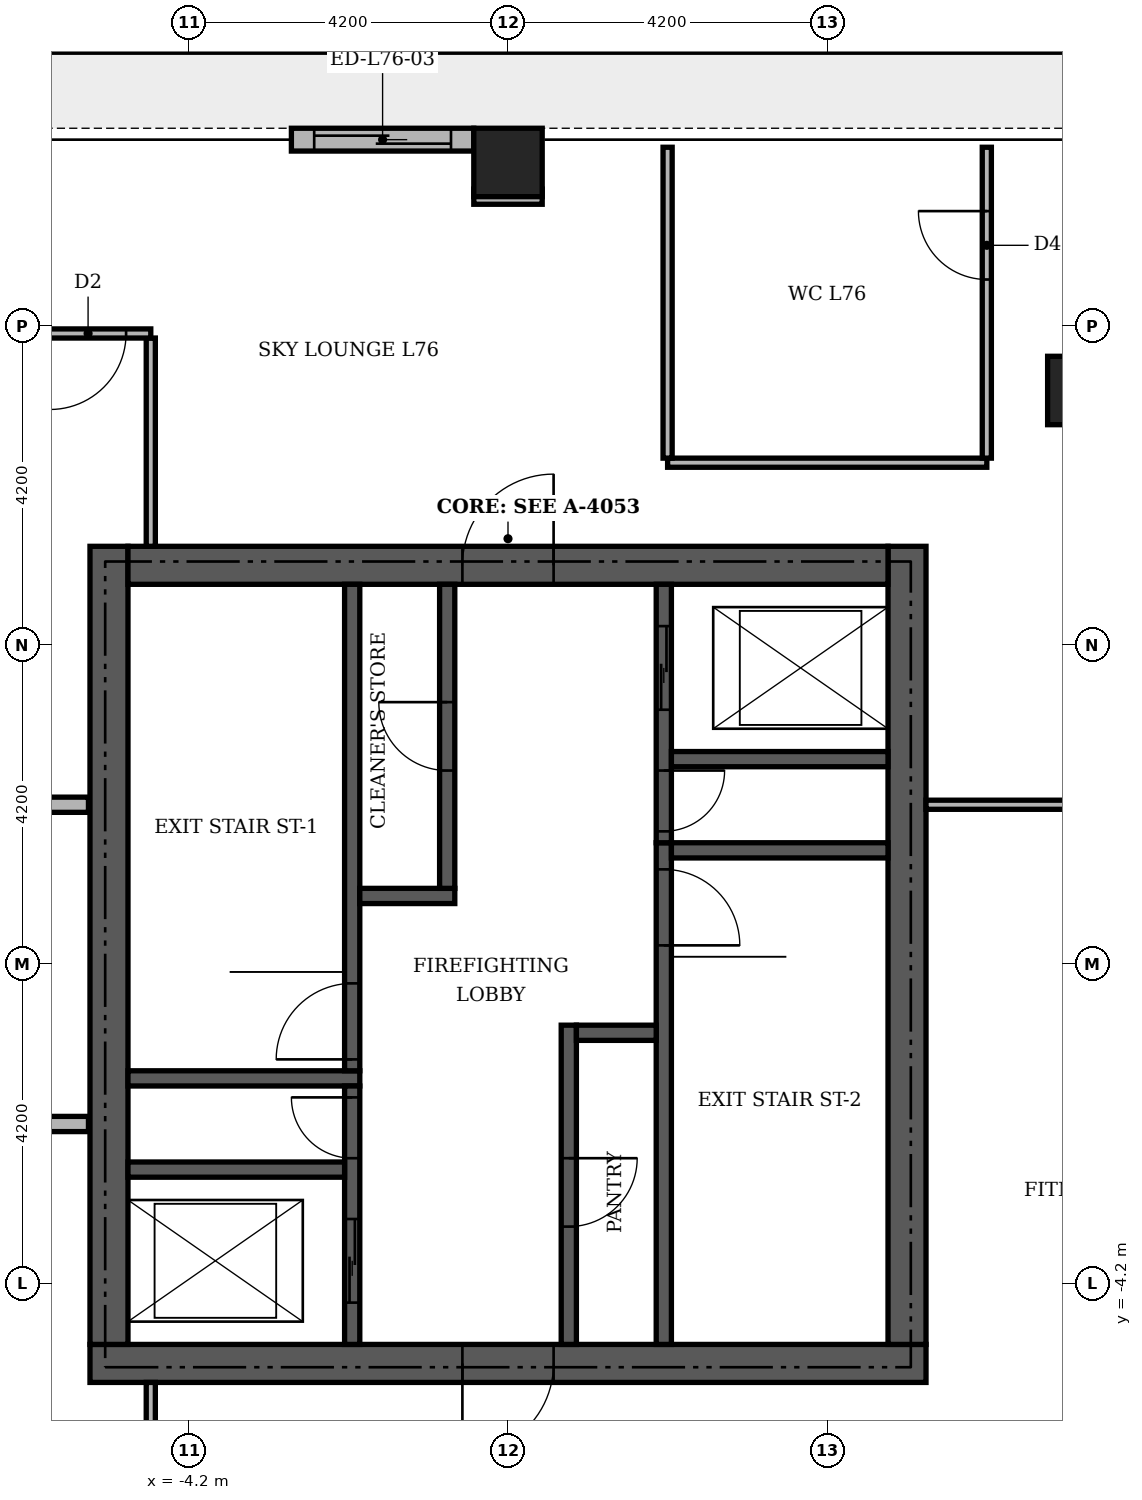
"""IFC4 building model, lengths in metres.
Left out: names, types, materials, properties, quantities, classifications, styles, units other than length and angle.
Written with IfcOpenShell. Run it as: python <this file> out.ifc"""

import sys

from ifc_helpers import new_model, si_unit, direction, frame, frame_2d, origin, origin_2d, place, context, subcontext, project, spatial, rectangle, extrude, element, fill, save


model = new_model("IFC4")
c1 = context("Model", 3, precision=1e-05, world=origin(), true_north=direction((0.0, 1.0)))
c2 = subcontext(c1, "Body", "Model", "MODEL_VIEW")
j1 = project(units=[si_unit("LENGTHUNIT", "METRE"), si_unit("PLANEANGLEUNIT", "RADIAN")], contexts=[c1])
p1 = place(None, origin())
s1 = spatial("IfcSite", under=j1, at=p1, CompositionType="ELEMENT")
p2 = place(p1, origin())
s2 = spatial("IfcBuilding", under=s1, at=p2, CompositionType="ELEMENT")
p3 = place(p2, frame((0.0, 0.0, 316.2)))
s3 = spatial("IfcBuildingStorey", under=s2, at=p3, CompositionType="ELEMENT", Elevation=316.2)
p4 = place(p3, frame((-5.5, -5.25, 0.0), z_axis=(0.0, 0.0, 1.0), x_axis=(1.0, 0.0, 0.0)))
e1 = element("IfcWall", 1, at=p4, inside=s3, PredefinedType="SHEAR", context=c2, shape_type="SweptSolid", body=[
    extrude(rectangle(XDim=11.0, YDim=0.5, at=frame_2d((5.5, 0.0))), origin(), (0.0, 0.0, 1.0), 5.0),
])
p5 = place(p4, frame((4.9, 0.0, 0.0)))
e2 = element("IfcOpeningElement", 2, at=p5, cuts=e1, PredefinedType="OPENING", context=c2, shape_type="SweptSolid", body=[
    extrude(rectangle(XDim=1.2, YDim=2.1, at=frame_2d((0.6, 1.05))), frame((0.0, 0.26, 0.0), z_axis=(0.0, -1.0, 0.0), x_axis=(1.0, 0.0, 0.0)), (0.0, 0.0, 1.0), 0.52),
])
for number, where, z_axis, x_axis in (
    (3, (-5.25, -5.0, 0.0), (0.0, 0.0, 1.0), (0.0, 1.0, 0.0)),
    (4, (5.25, -5.0, 0.0), (0.0, 0.0, 1.0), (0.0, 1.0, 0.0)),
):
    element("IfcWall", number, at=place(p3, frame(where, z_axis=z_axis, x_axis=x_axis)), inside=s3, PredefinedType="SHEAR", context=c2, shape_type="SweptSolid", body=[
        extrude(rectangle(XDim=10.5, YDim=0.5, at=frame_2d((5.25, 0.0))), origin(), (0.0, 0.0, 1.0), 5.0),
    ])
p6 = place(p3, frame((-5.0, 5.25, 0.0), z_axis=(0.0, 0.0, 1.0), x_axis=(1.0, 0.0, 0.0)))
e5 = element("IfcWall", 5, at=p6, inside=s3, PredefinedType="SHEAR", context=c2, shape_type="SweptSolid", body=[
    extrude(rectangle(XDim=10.0, YDim=0.5, at=frame_2d((5.0, 0.0))), origin(), (0.0, 0.0, 1.0), 5.0),
])
p7 = place(p6, frame((4.4, 0.0, 0.0)))
e6 = element("IfcOpeningElement", 6, at=p7, cuts=e5, PredefinedType="OPENING", context=c2, shape_type="SweptSolid", body=[
    extrude(rectangle(XDim=1.2, YDim=2.1, at=frame_2d((0.6, 1.05))), frame((0.0, 0.26, 0.0), z_axis=(0.0, -1.0, 0.0), x_axis=(1.0, 0.0, 0.0)), (0.0, 0.0, 1.0), 0.52),
])
p8 = place(p3, frame((2.05, -5.0, 0.0), z_axis=(0.0, 0.0, 1.0), x_axis=(0.0, 1.0, 0.0)))
e7 = element("IfcWall", 7, at=p8, inside=s3, PredefinedType="SHEAR", context=c2, shape_type="SweptSolid", body=[
    extrude(rectangle(XDim=6.6, YDim=0.2, at=frame_2d((3.3, 0.0))), origin(), (0.0, 0.0, 1.0), 5.0),
])
p9 = place(p8, frame((5.25, 0.0, 0.0)))
e8 = element("IfcOpeningElement", 8, at=p9, cuts=e7, PredefinedType="OPENING", context=c2, shape_type="SweptSolid", body=[
    extrude(rectangle(XDim=1.0, YDim=2.1, at=frame_2d((0.5, 1.05))), frame((0.0, 0.11, 0.0), z_axis=(0.0, -1.0, 0.0), x_axis=(1.0, 0.0, 0.0)), (0.0, 0.0, 1.0), 0.22),
])
p10 = place(p3, frame((-5.0, -1.5, 0.0), z_axis=(0.0, 0.0, 1.0), x_axis=(1.0, 0.0, 0.0)))
e9 = element("IfcWall", 9, at=p10, inside=s3, PredefinedType="SHEAR", context=c2, shape_type="SweptSolid", body=[
    extrude(rectangle(XDim=3.05, YDim=0.2, at=frame_2d((1.525, 0.0))), origin(), (0.0, 0.0, 1.0), 5.0),
])
p11 = place(p3, frame((-2.05, -1.4, 0.0), z_axis=(0.0, 0.0, 1.0), x_axis=(0.0, 1.0, 0.0)))
e10 = element("IfcWall", 10, at=p11, inside=s3, PredefinedType="SHEAR", context=c2, shape_type="SweptSolid", body=[
    extrude(rectangle(XDim=6.4, YDim=0.2, at=frame_2d((3.2, 0.0))), origin(), (0.0, 0.0, 1.0), 5.0),
])
p12 = place(p11, frame((0.15, 0.0, 0.0)))
e11 = element("IfcOpeningElement", 11, at=p12, cuts=e10, PredefinedType="OPENING", context=c2, shape_type="SweptSolid", body=[
    extrude(rectangle(XDim=1.0, YDim=2.1, at=frame_2d((0.5, 1.05))), frame((0.0, 0.11, 0.0), z_axis=(0.0, -1.0, 0.0), x_axis=(1.0, 0.0, 0.0)), (0.0, 0.0, 1.0), 0.22),
])
p13 = place(p3, frame((2.15, 1.5, 0.0), z_axis=(0.0, 0.0, 1.0), x_axis=(1.0, 0.0, 0.0)))
e12 = element("IfcWall", 12, at=p13, inside=s3, PredefinedType="SHEAR", context=c2, shape_type="SweptSolid", body=[
    extrude(rectangle(XDim=2.85, YDim=0.2, at=frame_2d((1.425, 0.0))), origin(), (0.0, 0.0, 1.0), 5.0),
])
p14 = place(p3, frame((-2.05, -5.0, 0.0), z_axis=(0.0, 0.0, 1.0), x_axis=(0.0, 1.0, 0.0)))
e13 = element("IfcWall", 13, at=p14, inside=s3, PredefinedType="SHEAR", context=c2, shape_type="SweptSolid", body=[
    extrude(rectangle(XDim=3.4, YDim=0.2, at=frame_2d((1.7, 0.0))), origin(), (0.0, 0.0, 1.0), 5.0),
])
p15 = place(p14, frame((0.55, 0.0, 0.0)))
e14 = element("IfcOpeningElement", 14, at=p15, cuts=e13, PredefinedType="OPENING", context=c2, shape_type="SweptSolid", body=[
    extrude(rectangle(XDim=1.1, YDim=2.1, at=frame_2d((0.55, 1.05))), frame((0.0, 0.11, 0.0), z_axis=(0.0, -1.0, 0.0), x_axis=(1.0, 0.0, 0.0)), (0.0, 0.0, 1.0), 0.22),
])
p16 = place(p14, frame((2.45, 0.0, 0.0)))
e15 = element("IfcOpeningElement", 15, at=p16, cuts=e13, PredefinedType="OPENING", context=c2, shape_type="SweptSolid", body=[
    extrude(rectangle(XDim=0.8, YDim=2.1, at=frame_2d((0.4, 1.05))), frame((0.0, 0.11, 0.0), z_axis=(0.0, -1.0, 0.0), x_axis=(1.0, 0.0, 0.0)), (0.0, 0.0, 1.0), 0.22),
])
p17 = place(p3, frame((0.8, -5.0, 0.0), z_axis=(0.0, 0.0, 1.0), x_axis=(0.0, 1.0, 0.0)))
e16 = element("IfcWall", 16, at=p17, inside=s3, PredefinedType="SHEAR", context=c2, shape_type="SweptSolid", body=[
    extrude(rectangle(XDim=4.2, YDim=0.2, at=frame_2d((2.1, 0.0))), origin(), (0.0, 0.0, 1.0), 5.0),
])
p18 = place(p17, frame((1.55, 0.0, 0.0)))
e17 = element("IfcOpeningElement", 17, at=p18, cuts=e16, PredefinedType="OPENING", context=c2, shape_type="SweptSolid", body=[
    extrude(rectangle(XDim=0.9, YDim=2.1, at=frame_2d((0.45, 1.05))), frame((0.0, 0.11, 0.0), z_axis=(0.0, -1.0, 0.0), x_axis=(1.0, 0.0, 0.0)), (0.0, 0.0, 1.0), 0.22),
])
p19 = place(p3, frame((-5.0, -2.7, 0.0), z_axis=(0.0, 0.0, 1.0), x_axis=(1.0, 0.0, 0.0)))
e18 = element("IfcWall", 18, at=p19, inside=s3, PredefinedType="SHEAR", context=c2, shape_type="SweptSolid", body=[
    extrude(rectangle(XDim=2.85, YDim=0.2, at=frame_2d((1.425, 0.0))), origin(), (0.0, 0.0, 1.0), 5.0),
])
p20 = place(p3, frame((0.9, -0.9, 0.0), z_axis=(0.0, 0.0, 1.0), x_axis=(1.0, 0.0, 0.0)))
e19 = element("IfcWall", 19, at=p20, inside=s3, PredefinedType="SHEAR", context=c2, shape_type="SweptSolid", body=[
    extrude(rectangle(XDim=1.05, YDim=0.2, at=frame_2d((0.525, 0.0))), origin(), (0.0, 0.0, 1.0), 5.0),
])
p21 = place(p3, frame((-1.95, 0.9, 0.0), z_axis=(0.0, 0.0, 1.0), x_axis=(1.0, 0.0, 0.0)))
e20 = element("IfcWall", 20, at=p21, inside=s3, PredefinedType="SHEAR", context=c2, shape_type="SweptSolid", body=[
    extrude(rectangle(XDim=1.25, YDim=0.2, at=frame_2d((0.625, 0.0))), origin(), (0.0, 0.0, 1.0), 5.0),
])
p22 = place(p3, frame((-0.8, 1.0, 0.0), z_axis=(0.0, 0.0, 1.0), x_axis=(0.0, 1.0, 0.0)))
e21 = element("IfcWall", 21, at=p22, inside=s3, PredefinedType="SHEAR", context=c2, shape_type="SweptSolid", body=[
    extrude(rectangle(XDim=4.0, YDim=0.2, at=frame_2d((2.0, 0.0))), origin(), (0.0, 0.0, 1.0), 5.0),
])
p23 = place(p22, frame((1.55, 0.0, 0.0)))
e22 = element("IfcOpeningElement", 22, at=p23, cuts=e21, PredefinedType="OPENING", context=c2, shape_type="SweptSolid", body=[
    extrude(rectangle(XDim=0.9, YDim=2.1, at=frame_2d((0.45, 1.05))), frame((0.0, 0.11, 0.0), z_axis=(0.0, -1.0, 0.0), x_axis=(1.0, 0.0, 0.0)), (0.0, 0.0, 1.0), 0.22),
])
p24 = place(p3, frame((2.05, 1.6, 0.0), z_axis=(0.0, 0.0, 1.0), x_axis=(0.0, 1.0, 0.0)))
e23 = element("IfcWall", 23, at=p24, inside=s3, PredefinedType="SHEAR", context=c2, shape_type="SweptSolid", body=[
    extrude(rectangle(XDim=3.4, YDim=0.2, at=frame_2d((1.7, 0.0))), origin(), (0.0, 0.0, 1.0), 5.0),
])
p25 = place(p24, frame((1.75, 0.0, 0.0)))
e24 = element("IfcOpeningElement", 24, at=p25, cuts=e23, PredefinedType="OPENING", context=c2, shape_type="SweptSolid", body=[
    extrude(rectangle(XDim=1.1, YDim=2.1, at=frame_2d((0.55, 1.05))), frame((0.0, 0.11, 0.0), z_axis=(0.0, -1.0, 0.0), x_axis=(1.0, 0.0, 0.0)), (0.0, 0.0, 1.0), 0.22),
])
p26 = place(p24, frame((0.15, 0.0, 0.0)))
e25 = element("IfcOpeningElement", 25, at=p26, cuts=e23, PredefinedType="OPENING", context=c2, shape_type="SweptSolid", body=[
    extrude(rectangle(XDim=0.8, YDim=2.1, at=frame_2d((0.4, 1.05))), frame((0.0, 0.11, 0.0), z_axis=(0.0, -1.0, 0.0), x_axis=(1.0, 0.0, 0.0)), (0.0, 0.0, 1.0), 0.22),
])
p27 = place(p3, frame((2.15, 2.7, 0.0), z_axis=(0.0, 0.0, 1.0), x_axis=(1.0, 0.0, 0.0)))
e26 = element("IfcWall", 26, at=p27, inside=s3, PredefinedType="SHEAR", context=c2, shape_type="SweptSolid", body=[
    extrude(rectangle(XDim=2.85, YDim=0.2, at=frame_2d((1.425, 0.0))), origin(), (0.0, 0.0, 1.0), 5.0),
])
for number, where, z_axis, x_axis in (
    (27, (7.55, 7.55, -0.35), (0.0, 0.0, 1.0), (1.0, 0.0, 0.0)),
    (28, (0.0, 10.55, -0.35), (0.0, 0.0, 1.0), (1.0, 0.0, 0.0)),
):
    element("IfcColumn", number, at=place(p3, frame(where, z_axis=z_axis, x_axis=x_axis)), inside=s3, PredefinedType="COLUMN", context=c2, shape_type="SweptSolid", body=[
        extrude(rectangle(XDim=0.9, YDim=0.9, at=origin_2d()), origin(), (0.0, 0.0, 1.0), 5.75),
    ])
p28 = place(p3, frame((-0.45, 10.85, 0.0), z_axis=(0.0, 0.0, 1.0), x_axis=(-1.0, 0.0, 0.0)))
e29 = element("IfcWall", 29, at=p28, inside=s3, PredefinedType="STANDARD", context=c2, shape_type="SweptSolid", body=[
    extrude(rectangle(XDim=2.4, YDim=0.3, at=frame_2d((1.2, 0.0))), origin(), (0.0, 0.0, 1.0), 5.0),
])
p29 = place(p28, frame((0.3, 0.0, 0.0)))
e30 = element("IfcOpeningElement", 30, at=p29, cuts=e29, PredefinedType="OPENING", context=c2, shape_type="SweptSolid", body=[
    extrude(rectangle(XDim=1.8, YDim=2.4, at=frame_2d((0.9, 1.2))), frame((0.0, 0.16, 0.0), z_axis=(0.0, -1.0, 0.0), x_axis=(1.0, 0.0, 0.0)), (0.0, 0.0, 1.0), 0.32),
])
p30 = place(p3, frame((-4.7, -8.24, 0.0), z_axis=(0.0, 0.0, 1.0), x_axis=(0.0, 1.0, 0.0)))
e31 = element("IfcWall", 31, at=p30, inside=s3, PredefinedType="PARTITIONING", context=c2, shape_type="SweptSolid", body=[
    extrude(rectangle(XDim=2.74, YDim=0.12, at=frame_2d((1.37, 0.0))), origin(), (0.0, 0.0, 1.0), 5.0),
])
for number, where, z_axis, x_axis in (
    (32, (-10.75, -2.1, 0.0), (0.0, 0.0, 1.0), (1.0, 0.0, 0.0)),
    (33, (-10.75, 2.1, 0.0), (0.0, 0.0, 1.0), (1.0, 0.0, 0.0)),
):
    element("IfcWall", number, at=place(p3, frame(where, z_axis=z_axis, x_axis=x_axis)), inside=s3, PredefinedType="PARTITIONING", context=c2, shape_type="SweptSolid", body=[
        extrude(rectangle(XDim=5.23, YDim=0.2, at=frame_2d((2.615, 0.0))), origin(), (0.0, 0.0, 1.0), 5.0),
    ])
p31 = place(p3, frame((5.5, 2.1, 0.0), z_axis=(0.0, 0.0, 1.0), x_axis=(1.0, 0.0, 0.0)))
e34 = element("IfcWall", 34, at=p31, inside=s3, PredefinedType="PARTITIONING", context=c2, shape_type="SweptSolid", body=[
    extrude(rectangle(XDim=5.25, YDim=0.12, at=frame_2d((2.625, 0.0))), origin(), (0.0, 0.0, 1.0), 5.0),
])
p32 = place(p3, frame((-4.7, 5.5, 0.0), z_axis=(0.0, 0.0, 1.0), x_axis=(0.0, 1.0, 0.0)))
e35 = element("IfcWall", 35, at=p32, inside=s3, PredefinedType="PARTITIONING", context=c2, shape_type="SweptSolid", body=[
    extrude(rectangle(XDim=2.74, YDim=0.12, at=frame_2d((1.37, 0.0))), origin(), (0.0, 0.0, 1.0), 5.0),
])
p33 = place(p3, frame((2.1, 6.6, 0.0), z_axis=(0.0, 0.0, 1.0), x_axis=(1.0, 0.0, 0.0)))
e36 = element("IfcWall", 36, at=p33, inside=s3, PredefinedType="PARTITIONING", context=c2, shape_type="SweptSolid", body=[
    extrude(rectangle(XDim=4.2, YDim=0.12, at=frame_2d((2.1, 0.0))), origin(), (0.0, 0.0, 1.0), 5.0),
])
p34 = place(p3, frame((2.1, 6.66, 0.0), z_axis=(0.0, 0.0, 1.0), x_axis=(0.0, 1.0, 0.0)))
e37 = element("IfcWall", 37, at=p34, inside=s3, PredefinedType="PARTITIONING", context=c2, shape_type="SweptSolid", body=[
    extrude(rectangle(XDim=4.09, YDim=0.12, at=frame_2d((2.045, 0.0))), origin(), (0.0, 0.0, 1.0), 5.0),
])
p35 = place(p3, frame((6.3, 6.66, 0.0), z_axis=(0.0, 0.0, 1.0), x_axis=(0.0, 1.0, 0.0)))
e38 = element("IfcWall", 38, at=p35, inside=s3, PredefinedType="PARTITIONING", context=c2, shape_type="SweptSolid", body=[
    extrude(rectangle(XDim=4.09, YDim=0.12, at=frame_2d((2.045, 0.0))), origin(), (0.0, 0.0, 1.0), 5.0),
])
p36 = place(p35, frame((2.35, 0.0, 0.0)))
e39 = element("IfcOpeningElement", 39, at=p36, cuts=e38, PredefinedType="OPENING", context=c2, shape_type="SweptSolid", body=[
    extrude(rectangle(XDim=0.9, YDim=2.1, at=frame_2d((0.45, 1.05))), frame((0.0, 0.07, 0.0), z_axis=(0.0, -1.0, 0.0), x_axis=(1.0, 0.0, 0.0)), (0.0, 0.0, 1.0), 0.14),
])
p37 = place(p3, frame((-7.75, 8.3, 0.0), z_axis=(0.0, 0.0, 1.0), x_axis=(1.0, 0.0, 0.0)))
e40 = element("IfcWall", 40, at=p37, inside=s3, PredefinedType="PARTITIONING", context=c2, shape_type="SweptSolid", body=[
    extrude(rectangle(XDim=3.05, YDim=0.12, at=frame_2d((1.525, 0.0))), origin(), (0.0, 0.0, 1.0), 5.0),
])
p38 = place(p37, frame((1.725, 0.0, 0.0)))
e41 = element("IfcOpeningElement", 41, at=p38, cuts=e40, PredefinedType="OPENING", context=c2, shape_type="SweptSolid", body=[
    extrude(rectangle(XDim=1.0, YDim=2.1, at=frame_2d((0.5, 1.05))), frame((0.0, 0.07, 0.0), z_axis=(0.0, -1.0, 0.0), x_axis=(1.0, 0.0, 0.0)), (0.0, 0.0, 1.0), 0.14),
])
p39 = place(p3, frame((-0.45, 10.1, 0.0), z_axis=(0.0, 0.0, 1.0), x_axis=(1.0, 0.0, 0.0)))
e42 = element("IfcWall", 42, at=p39, inside=s3, PredefinedType="PARTITIONING", context=c2, shape_type="SweptSolid", body=[
    extrude(rectangle(XDim=0.9, YDim=0.2, at=frame_2d((0.45, 0.0))), origin(), (0.0, 0.0, 1.0), 5.0),
])
p40 = place(p29, origin())
e43 = element("IfcDoor", 43, at=p40, inside=s3, OperationType="SLIDING_TO_LEFT", PredefinedType="DOOR", context=c2, shape_type="SweptSolid", body=[
    extrude(rectangle(XDim=1.8, YDim=2.4, at=frame_2d((0.9, 1.2))), frame((0.0, 0.025, 0.0), z_axis=(0.0, -1.0, 0.0), x_axis=(1.0, 0.0, 0.0)), (0.0, 0.0, 1.0), 0.05),
])
fill(e30, e43)
p41 = place(p25, origin())
e44 = element("IfcDoor", 44, at=p41, inside=s3, OperationType="SLIDING_TO_LEFT", PredefinedType="DOOR", context=c2, shape_type="SweptSolid", body=[
    extrude(rectangle(XDim=1.1, YDim=2.1, at=frame_2d((0.55, 1.05))), frame((0.0, 0.025, 0.0), z_axis=(0.0, -1.0, 0.0), x_axis=(1.0, 0.0, 0.0)), (0.0, 0.0, 1.0), 0.05),
])
fill(e24, e44)
p42 = place(p15, origin())
e45 = element("IfcDoor", 45, at=p42, inside=s3, OperationType="SLIDING_TO_LEFT", PredefinedType="DOOR", context=c2, shape_type="SweptSolid", body=[
    extrude(rectangle(XDim=1.1, YDim=2.1, at=frame_2d((0.55, 1.05))), frame((0.0, 0.025, 0.0), z_axis=(0.0, -1.0, 0.0), x_axis=(1.0, 0.0, 0.0)), (0.0, 0.0, 1.0), 0.05),
])
fill(e14, e45)
p43 = place(p12, origin())
e46 = element("IfcDoor", 46, at=p43, inside=s3, OperationType="SINGLE_SWING_LEFT", PredefinedType="DOOR", context=c2, shape_type="SweptSolid", body=[
    extrude(rectangle(XDim=1.0, YDim=2.1, at=frame_2d((0.5, 1.05))), frame((0.0, 0.025, 0.0), z_axis=(0.0, -1.0, 0.0), x_axis=(1.0, 0.0, 0.0)), (0.0, 0.0, 1.0), 0.05),
])
fill(e11, e46)
p44 = place(p9, frame((1.0, 0.0, 0.0), z_axis=(0.0, 0.0, 1.0), x_axis=(-1.0, 0.0, 0.0)))
e47 = element("IfcDoor", 47, at=p44, inside=s3, OperationType="SINGLE_SWING_LEFT", PredefinedType="DOOR", context=c2, shape_type="SweptSolid", body=[
    extrude(rectangle(XDim=1.0, YDim=2.1, at=frame_2d((0.5, 1.05))), frame((0.0, 0.025, 0.0), z_axis=(0.0, -1.0, 0.0), x_axis=(1.0, 0.0, 0.0)), (0.0, 0.0, 1.0), 0.05),
])
fill(e8, e47)
p45 = place(p26, frame((0.8, 0.0, 0.0), z_axis=(0.0, 0.0, 1.0), x_axis=(-1.0, 0.0, 0.0)))
e48 = element("IfcDoor", 48, at=p45, inside=s3, OperationType="SINGLE_SWING_RIGHT", PredefinedType="DOOR", context=c2, shape_type="SweptSolid", body=[
    extrude(rectangle(XDim=0.8, YDim=2.1, at=frame_2d((0.4, 1.05))), frame((0.0, 0.025, 0.0), z_axis=(0.0, -1.0, 0.0), x_axis=(1.0, 0.0, 0.0)), (0.0, 0.0, 1.0), 0.05),
])
fill(e25, e48)
p46 = place(p16, origin())
e49 = element("IfcDoor", 49, at=p46, inside=s3, OperationType="SINGLE_SWING_RIGHT", PredefinedType="DOOR", context=c2, shape_type="SweptSolid", body=[
    extrude(rectangle(XDim=0.8, YDim=2.1, at=frame_2d((0.4, 1.05))), frame((0.0, 0.025, 0.0), z_axis=(0.0, -1.0, 0.0), x_axis=(1.0, 0.0, 0.0)), (0.0, 0.0, 1.0), 0.05),
])
fill(e15, e49)
p47 = place(p23, origin())
e50 = element("IfcDoor", 50, at=p47, inside=s3, OperationType="SINGLE_SWING_RIGHT", PredefinedType="DOOR", context=c2, shape_type="SweptSolid", body=[
    extrude(rectangle(XDim=0.9, YDim=2.1, at=frame_2d((0.45, 1.05))), frame((0.0, 0.025, 0.0), z_axis=(0.0, -1.0, 0.0), x_axis=(1.0, 0.0, 0.0)), (0.0, 0.0, 1.0), 0.05),
])
fill(e22, e50)
p48 = place(p18, frame((0.9, 0.0, 0.0), z_axis=(0.0, 0.0, 1.0), x_axis=(-1.0, 0.0, 0.0)))
e51 = element("IfcDoor", 51, at=p48, inside=s3, OperationType="SINGLE_SWING_RIGHT", PredefinedType="DOOR", context=c2, shape_type="SweptSolid", body=[
    extrude(rectangle(XDim=0.9, YDim=2.1, at=frame_2d((0.45, 1.05))), frame((0.0, 0.025, 0.0), z_axis=(0.0, -1.0, 0.0), x_axis=(1.0, 0.0, 0.0)), (0.0, 0.0, 1.0), 0.05),
])
fill(e17, e51)
p49 = place(p7, origin())
e52 = element("IfcDoor", 52, at=p49, inside=s3, OperationType="SINGLE_SWING_RIGHT", PredefinedType="DOOR", context=c2, shape_type="SweptSolid", body=[
    extrude(rectangle(XDim=1.2, YDim=2.1, at=frame_2d((0.6, 1.05))), frame((0.0, 0.025, 0.0), z_axis=(0.0, -1.0, 0.0), x_axis=(1.0, 0.0, 0.0)), (0.0, 0.0, 1.0), 0.05),
])
fill(e6, e52)
p50 = place(p5, frame((1.2, 0.0, 0.0), z_axis=(0.0, 0.0, 1.0), x_axis=(-1.0, 0.0, 0.0)))
e53 = element("IfcDoor", 53, at=p50, inside=s3, OperationType="SINGLE_SWING_LEFT", PredefinedType="DOOR", context=c2, shape_type="SweptSolid", body=[
    extrude(rectangle(XDim=1.2, YDim=2.1, at=frame_2d((0.6, 1.05))), frame((0.0, 0.025, 0.0), z_axis=(0.0, -1.0, 0.0), x_axis=(1.0, 0.0, 0.0)), (0.0, 0.0, 1.0), 0.05),
])
fill(e2, e53)
p51 = place(p38, frame((1.0, 0.0, 0.0), z_axis=(0.0, 0.0, 1.0), x_axis=(-1.0, 0.0, 0.0)))
e54 = element("IfcDoor", 54, at=p51, inside=s3, OperationType="SINGLE_SWING_LEFT", PredefinedType="DOOR", context=c2, shape_type="SweptSolid", body=[
    extrude(rectangle(XDim=1.0, YDim=2.1, at=frame_2d((0.5, 1.05))), frame((0.0, 0.025, 0.0), z_axis=(0.0, -1.0, 0.0), x_axis=(1.0, 0.0, 0.0)), (0.0, 0.0, 1.0), 0.05),
])
fill(e41, e54)
p52 = place(p36, origin())
e55 = element("IfcDoor", 55, at=p52, inside=s3, OperationType="SINGLE_SWING_RIGHT", PredefinedType="DOOR", context=c2, shape_type="SweptSolid", body=[
    extrude(rectangle(XDim=0.9, YDim=2.1, at=frame_2d((0.45, 1.05))), frame((0.0, 0.025, 0.0), z_axis=(0.0, -1.0, 0.0), x_axis=(1.0, 0.0, 0.0)), (0.0, 0.0, 1.0), 0.05),
])
fill(e39, e55)
save(model, sys.argv[1])
